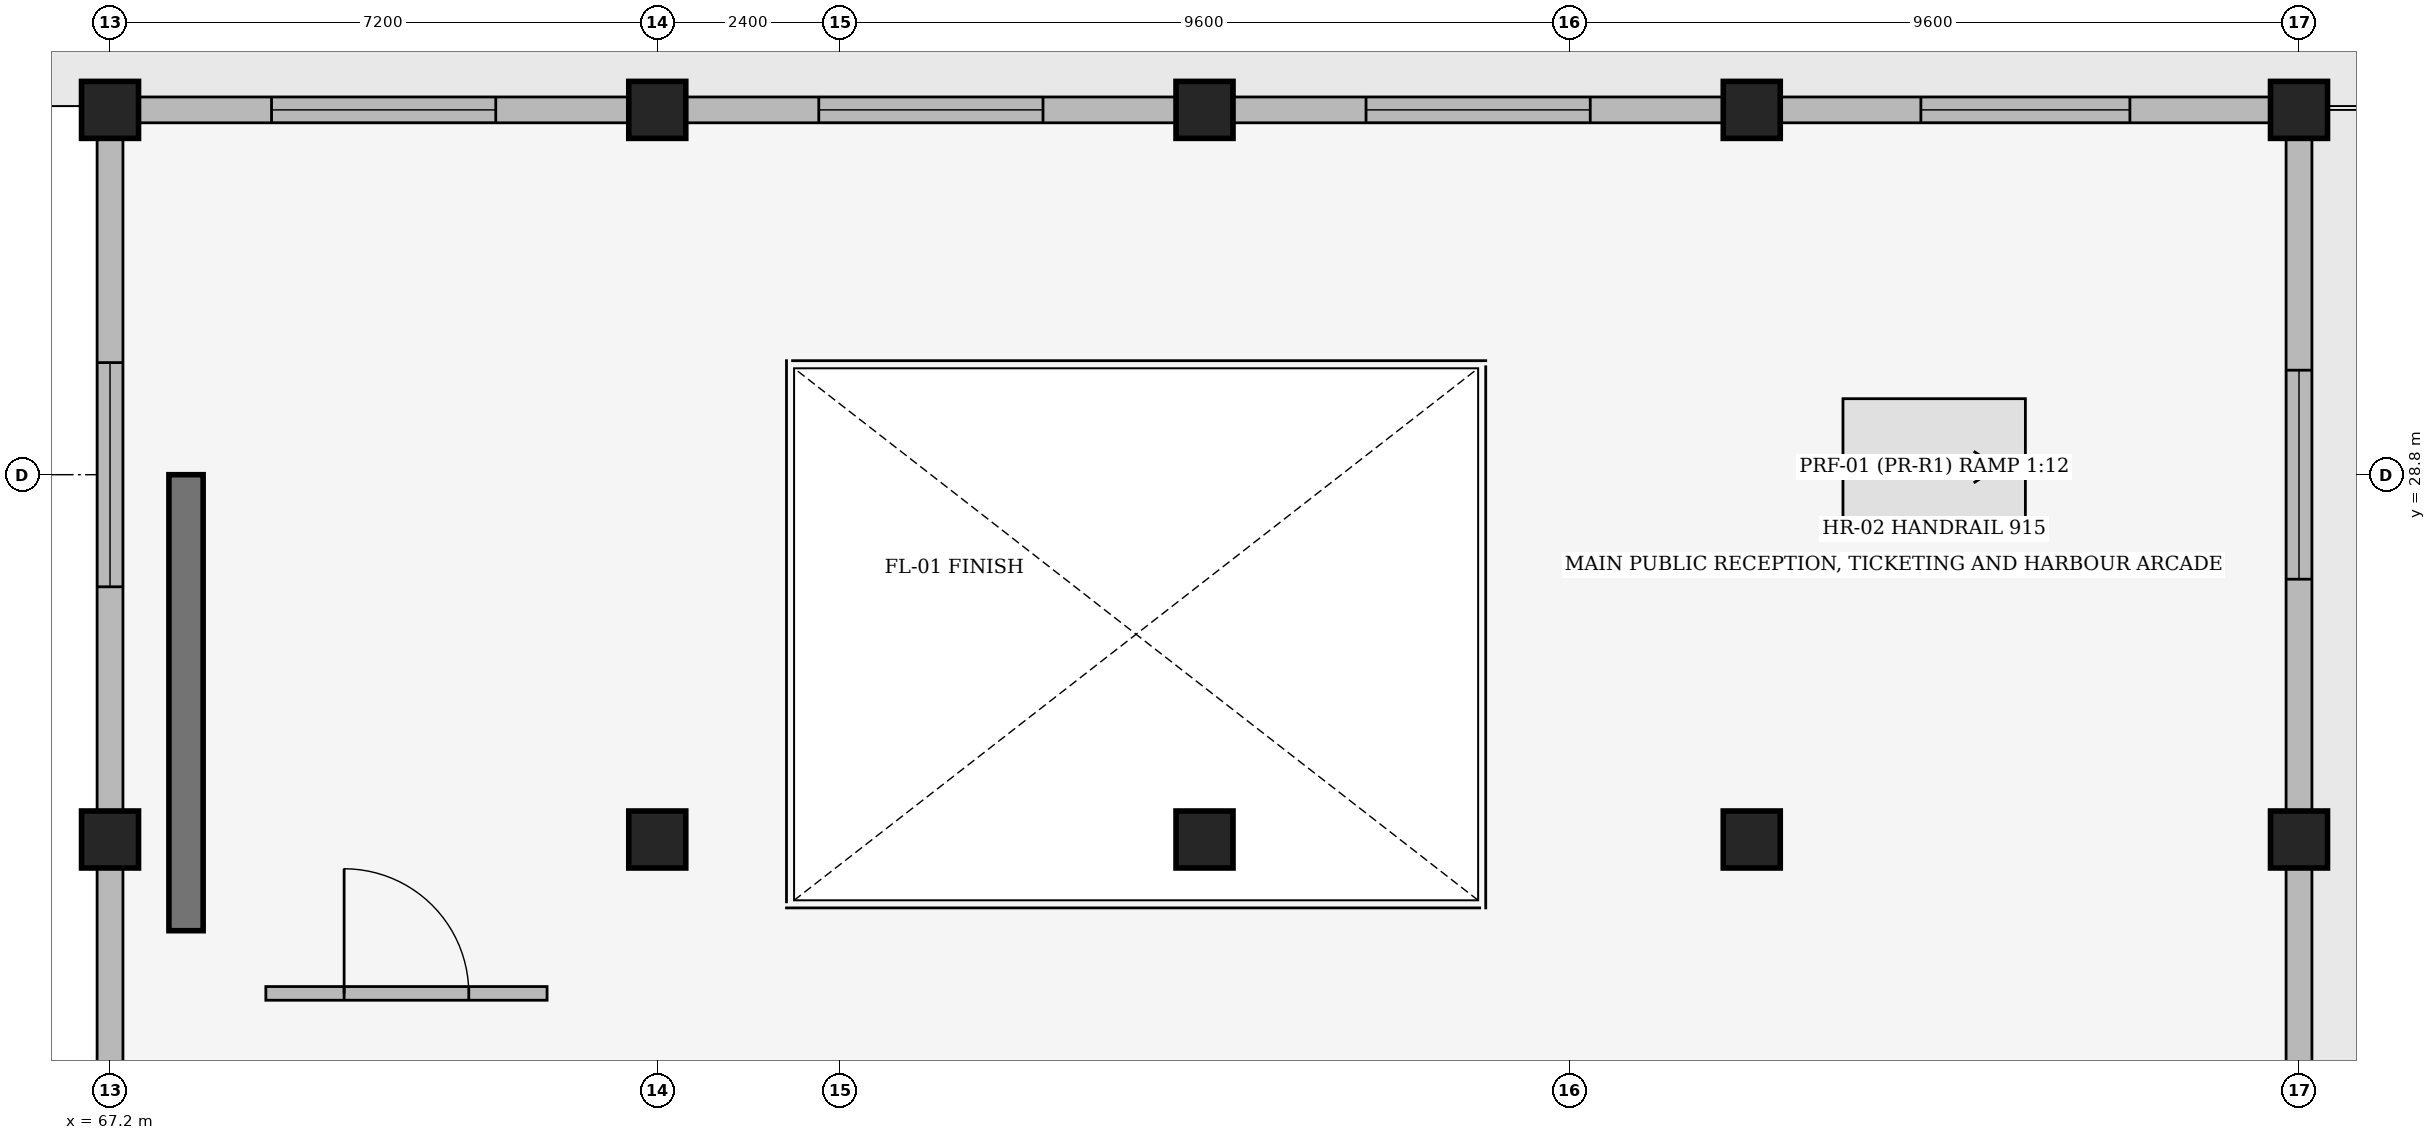
"""IFC4 building model, lengths in metres.
Left out: names, types, materials, properties, quantities, classifications, styles, units other than length and angle.
Written with IfcOpenShell. Run it as: python <this file> out.ifc"""

import sys

from ifc_helpers import new_model, si_unit, direction, frame, frame_2d, origin, origin_2d, place, context, subcontext, project, spatial, rectangle, extrude, element, fill, save


model = new_model("IFC4")
c1 = context("Model", 3, precision=1e-05, world=origin(), true_north=direction((0.0, 1.0)))
c2 = subcontext(c1, "Body", "Model", "MODEL_VIEW")
j1 = project(units=[si_unit("LENGTHUNIT", "METRE"), si_unit("PLANEANGLEUNIT", "RADIAN")], contexts=[c1])
p1 = place(None, origin())
s1 = spatial("IfcSite", under=j1, at=p1, CompositionType="ELEMENT")
p2 = place(p1, origin())
s2 = spatial("IfcBuilding", under=s1, at=p2, CompositionType="ELEMENT")
p3 = place(p2, origin())
s3 = spatial("IfcBuildingStorey", under=s2, at=p3, CompositionType="ELEMENT", Elevation=0.0)
for number, where, z_axis, x_axis in (
    (1, (67.2, 24.0, 0.0), (0.0, 0.0, 1.0), (1.0, 0.0, 0.0)),
    (2, (67.2, 33.6, 0.0), (0.0, 0.0, 1.0), (1.0, 0.0, 0.0)),
    (3, (74.4, 24.0, 0.0), (0.0, 0.0, 1.0), (1.0, 0.0, 0.0)),
    (4, (74.4, 33.6, 0.0), (0.0, 0.0, 1.0), (1.0, 0.0, 0.0)),
):
    element("IfcColumn", number, at=place(p3, frame(where, z_axis=z_axis, x_axis=x_axis)), inside=s3, PredefinedType="COLUMN", context=c2, shape_type="SweptSolid", body=[
        extrude(rectangle(XDim=0.75, YDim=0.75, at=origin_2d()), origin(), (0.0, 0.0, 1.0), 5.4),
    ])
p4 = place(p3, frame((81.6, 24.0, -0.3), z_axis=(0.0, 0.0, 1.0), x_axis=(1.0, 0.0, 0.0)))
e5 = element("IfcColumn", 5, at=p4, inside=s3, PredefinedType="COLUMN", context=c2, shape_type="SweptSolid", body=[
    extrude(rectangle(XDim=0.75, YDim=0.75, at=origin_2d()), origin(), (0.0, 0.0, 1.0), 5.7),
])
for number, where, z_axis, x_axis in (
    (6, (81.6, 33.6, 0.0), (0.0, 0.0, 1.0), (1.0, 0.0, 0.0)),
    (7, (88.8, 24.0, 0.0), (0.0, 0.0, 1.0), (1.0, 0.0, 0.0)),
    (8, (88.8, 33.6, 0.0), (0.0, 0.0, 1.0), (1.0, 0.0, 0.0)),
    (9, (96.0, 24.0, 0.0), (0.0, 0.0, 1.0), (1.0, 0.0, 0.0)),
    (10, (96.0, 33.6, 0.0), (0.0, 0.0, 1.0), (1.0, 0.0, 0.0)),
):
    element("IfcColumn", number, at=place(p3, frame(where, z_axis=z_axis, x_axis=x_axis)), inside=s3, PredefinedType="COLUMN", context=c2, shape_type="SweptSolid", body=[
        extrude(rectangle(XDim=0.75, YDim=0.75, at=origin_2d()), origin(), (0.0, 0.0, 1.0), 5.4),
    ])
p5 = place(p3, frame((68.2, 22.8, 0.0), z_axis=(0.0, 0.0, 1.0), x_axis=(0.0, 1.0, 0.0)))
e11 = element("IfcWall", 11, at=p5, inside=s3, PredefinedType="SHEAR", context=c2, shape_type="SweptSolid", body=[
    extrude(rectangle(XDim=6.0, YDim=0.45, at=frame_2d((3.0, 0.0))), origin(), (0.0, 0.0, 1.0), 5.4),
])
p6 = place(p3, frame((96.0, 14.783, 0.0), z_axis=(0.0, 0.0, 1.0), x_axis=(0.0, 1.0, 0.0)))
e12 = element("IfcWall", 12, at=p6, inside=s3, PredefinedType="SOLIDWALL", context=c2, shape_type="SweptSolid", body=[
    extrude(rectangle(XDim=8.834, YDim=0.34, at=frame_2d((4.417, 0.0))), origin(), (0.0, 0.0, 1.0), 4.766),
])
p7 = place(p6, frame((5.417, 0.0, 0.0), z_axis=(0.0, 0.0, 1.0), x_axis=(-1.0, 0.0, 0.0)))
e13 = element("IfcOpeningElement", 13, at=p7, cuts=e12, PredefinedType="OPENING", context=c2, shape_type="SweptSolid", body=[
    extrude(rectangle(XDim=2.0, YDim=2.5, at=frame_2d((1.0, 1.25))), frame((0.0, 0.18, 0.0), z_axis=(0.0, -1.0, 0.0), x_axis=(1.0, 0.0, 0.0)), (0.0, 0.0, 1.0), 0.36),
])
p8 = place(p3, frame((96.0, 24.383, 0.0), z_axis=(0.0, 0.0, 1.0), x_axis=(0.0, 1.0, 0.0)))
e14 = element("IfcWall", 14, at=p8, inside=s3, PredefinedType="SOLIDWALL", context=c2, shape_type="SweptSolid", body=[
    extrude(rectangle(XDim=8.834, YDim=0.34, at=frame_2d((4.417, 0.0))), origin(), (0.0, 0.0, 1.0), 4.649),
])
p9 = place(p8, frame((3.042, 0.0, 0.95)))
e15 = element("IfcOpeningElement", 15, at=p9, cuts=e14, PredefinedType="OPENING", context=c2, shape_type="SweptSolid", body=[
    extrude(rectangle(XDim=2.75, YDim=1.8, at=frame_2d((1.375, 0.9))), frame((0.0, 0.18, 0.0), z_axis=(0.0, -1.0, 0.0), x_axis=(1.0, 0.0, 0.0)), (0.0, 0.0, 1.0), 0.36),
])
p10 = place(p3, frame((95.617, 33.6, 0.0), z_axis=(0.0, 0.0, 1.0), x_axis=(-1.0, 0.0, 0.0)))
e16 = element("IfcWall", 16, at=p10, inside=s3, PredefinedType="SOLIDWALL", context=c2, shape_type="SweptSolid", body=[
    extrude(rectangle(XDim=6.434, YDim=0.34, at=frame_2d((3.217, 0.0))), origin(), (0.0, 0.0, 1.0), 4.758),
])
p11 = place(p10, frame((1.842, 0.0, 0.95)))
e17 = element("IfcOpeningElement", 17, at=p11, cuts=e16, PredefinedType="OPENING", context=c2, shape_type="SweptSolid", body=[
    extrude(rectangle(XDim=2.75, YDim=2.1, at=frame_2d((1.375, 1.05))), frame((0.0, 0.18, 0.0), z_axis=(0.0, -1.0, 0.0), x_axis=(1.0, 0.0, 0.0)), (0.0, 0.0, 1.0), 0.36),
])
p12 = place(p3, frame((88.417, 33.6, 0.0), z_axis=(0.0, 0.0, 1.0), x_axis=(-1.0, 0.0, 0.0)))
e18 = element("IfcWall", 18, at=p12, inside=s3, PredefinedType="SOLIDWALL", context=c2, shape_type="SweptSolid", body=[
    extrude(rectangle(XDim=6.434, YDim=0.34, at=frame_2d((3.217, 0.0))), origin(), (0.0, 0.0, 1.0), 4.863),
])
p13 = place(p12, frame((1.742, 0.0, 0.95)))
e19 = element("IfcOpeningElement", 19, at=p13, cuts=e18, PredefinedType="OPENING", context=c2, shape_type="SweptSolid", body=[
    extrude(rectangle(XDim=2.95, YDim=1.2, at=frame_2d((1.475, 0.6))), frame((0.0, 0.18, 0.0), z_axis=(0.0, -1.0, 0.0), x_axis=(1.0, 0.0, 0.0)), (0.0, 0.0, 1.0), 0.36),
])
p14 = place(p3, frame((81.217, 33.6, 0.0), z_axis=(0.0, 0.0, 1.0), x_axis=(-1.0, 0.0, 0.0)))
e20 = element("IfcWall", 20, at=p14, inside=s3, PredefinedType="SOLIDWALL", context=c2, shape_type="SweptSolid", body=[
    extrude(rectangle(XDim=6.434, YDim=0.34, at=frame_2d((3.217, 0.0))), origin(), (0.0, 0.0, 1.0), 4.758),
])
p15 = place(p14, frame((1.742, 0.0, 0.95)))
e21 = element("IfcOpeningElement", 21, at=p15, cuts=e20, PredefinedType="OPENING", context=c2, shape_type="SweptSolid", body=[
    extrude(rectangle(XDim=2.95, YDim=1.5, at=frame_2d((1.475, 0.75))), frame((0.0, 0.18, 0.0), z_axis=(0.0, -1.0, 0.0), x_axis=(1.0, 0.0, 0.0)), (0.0, 0.0, 1.0), 0.36),
])
p16 = place(p3, frame((74.017, 33.6, 0.0), z_axis=(0.0, 0.0, 1.0), x_axis=(-1.0, 0.0, 0.0)))
e22 = element("IfcWall", 22, at=p16, inside=s3, PredefinedType="SOLIDWALL", context=c2, shape_type="SweptSolid", body=[
    extrude(rectangle(XDim=6.434, YDim=0.34, at=frame_2d((3.217, 0.0))), origin(), (0.0, 0.0, 1.0), 4.863),
])
p17 = place(p16, frame((1.742, 0.0, 0.95)))
e23 = element("IfcOpeningElement", 23, at=p17, cuts=e22, PredefinedType="OPENING", context=c2, shape_type="SweptSolid", body=[
    extrude(rectangle(XDim=2.95, YDim=1.8, at=frame_2d((1.475, 0.9))), frame((0.0, 0.18, 0.0), z_axis=(0.0, -1.0, 0.0), x_axis=(1.0, 0.0, 0.0)), (0.0, 0.0, 1.0), 0.36),
])
p18 = place(p3, frame((67.2, 33.217, 0.0), z_axis=(0.0, 0.0, 1.0), x_axis=(0.0, -1.0, 0.0)))
e24 = element("IfcWall", 24, at=p18, inside=s3, PredefinedType="SOLIDWALL", context=c2, shape_type="SweptSolid", body=[
    extrude(rectangle(XDim=8.834, YDim=0.34, at=frame_2d((4.417, 0.0))), origin(), (0.0, 0.0, 1.0), 4.713),
])
p19 = place(p18, frame((2.942, 0.0, 0.95)))
e25 = element("IfcOpeningElement", 25, at=p19, cuts=e24, PredefinedType="OPENING", context=c2, shape_type="SweptSolid", body=[
    extrude(rectangle(XDim=2.95, YDim=2.1, at=frame_2d((1.475, 1.05))), frame((0.0, 0.18, 0.0), z_axis=(0.0, -1.0, 0.0), x_axis=(1.0, 0.0, 0.0)), (0.0, 0.0, 1.0), 0.36),
])
p20 = place(p3, frame((67.2, 23.617, 0.0), z_axis=(0.0, 0.0, 1.0), x_axis=(0.0, -1.0, 0.0)))
e26 = element("IfcWall", 26, at=p20, inside=s3, PredefinedType="SOLIDWALL", context=c2, shape_type="SweptSolid", body=[
    extrude(rectangle(XDim=8.834, YDim=0.34, at=frame_2d((4.417, 0.0))), origin(), (0.0, 0.0, 1.0), 4.713),
])
p21 = place(p20, frame((2.842, 0.0, 0.95)))
e27 = element("IfcOpeningElement", 27, at=p21, cuts=e26, PredefinedType="OPENING", context=c2, shape_type="SweptSolid", body=[
    extrude(rectangle(XDim=3.15, YDim=1.2, at=frame_2d((1.575, 0.6))), frame((0.0, 0.18, 0.0), z_axis=(0.0, -1.0, 0.0), x_axis=(1.0, 0.0, 0.0)), (0.0, 0.0, 1.0), 0.36),
])
p22 = place(p3, frame((69.25, 21.975, 0.0), z_axis=(0.0, 0.0, 1.0), x_axis=(1.0, 0.0, 0.0)))
e28 = element("IfcWall", 28, at=p22, inside=s3, PredefinedType="PARTITIONING", context=c2, shape_type="SweptSolid", body=[
    extrude(rectangle(XDim=3.7, YDim=0.18, at=frame_2d((1.85, 0.0))), origin(), (0.0, 0.0, 1.0), 4.713),
])
p23 = place(p22, frame((1.03, 0.0, 0.0)))
e29 = element("IfcOpeningElement", 29, at=p23, cuts=e28, PredefinedType="OPENING", context=c2, shape_type="SweptSolid", body=[
    extrude(rectangle(XDim=1.64, YDim=2.35, at=frame_2d((0.82, 1.175))), frame((0.0, 0.1, 0.0), z_axis=(0.0, -1.0, 0.0), x_axis=(1.0, 0.0, 0.0)), (0.0, 0.0, 1.0), 0.2),
])
p24 = place(p9, origin())
e30 = element("IfcWindow", 30, at=p24, inside=s3, PartitioningType="SINGLE_PANEL", PredefinedType="WINDOW", context=c2, shape_type="SweptSolid", body=[
    extrude(rectangle(XDim=2.75, YDim=1.8, at=frame_2d((1.375, 0.9))), frame((0.0, 0.03, 0.0), z_axis=(0.0, -1.0, 0.0), x_axis=(1.0, 0.0, 0.0)), (0.0, 0.0, 1.0), 0.06),
])
fill(e15, e30)
p25 = place(p11, origin())
e31 = element("IfcWindow", 31, at=p25, inside=s3, PartitioningType="SINGLE_PANEL", PredefinedType="WINDOW", context=c2, shape_type="SweptSolid", body=[
    extrude(rectangle(XDim=2.75, YDim=2.1, at=frame_2d((1.375, 1.05))), frame((0.0, 0.03, 0.0), z_axis=(0.0, -1.0, 0.0), x_axis=(1.0, 0.0, 0.0)), (0.0, 0.0, 1.0), 0.06),
])
fill(e17, e31)
p26 = place(p13, origin())
e32 = element("IfcWindow", 32, at=p26, inside=s3, PartitioningType="SINGLE_PANEL", PredefinedType="WINDOW", context=c2, shape_type="SweptSolid", body=[
    extrude(rectangle(XDim=2.95, YDim=1.2, at=frame_2d((1.475, 0.6))), frame((0.0, 0.03, 0.0), z_axis=(0.0, -1.0, 0.0), x_axis=(1.0, 0.0, 0.0)), (0.0, 0.0, 1.0), 0.06),
])
fill(e19, e32)
p27 = place(p15, origin())
e33 = element("IfcWindow", 33, at=p27, inside=s3, PartitioningType="SINGLE_PANEL", PredefinedType="WINDOW", context=c2, shape_type="SweptSolid", body=[
    extrude(rectangle(XDim=2.95, YDim=1.5, at=frame_2d((1.475, 0.75))), frame((0.0, 0.03, 0.0), z_axis=(0.0, -1.0, 0.0), x_axis=(1.0, 0.0, 0.0)), (0.0, 0.0, 1.0), 0.06),
])
fill(e21, e33)
p28 = place(p17, origin())
e34 = element("IfcWindow", 34, at=p28, inside=s3, PartitioningType="SINGLE_PANEL", PredefinedType="WINDOW", context=c2, shape_type="SweptSolid", body=[
    extrude(rectangle(XDim=2.95, YDim=1.8, at=frame_2d((1.475, 0.9))), frame((0.0, 0.03, 0.0), z_axis=(0.0, -1.0, 0.0), x_axis=(1.0, 0.0, 0.0)), (0.0, 0.0, 1.0), 0.06),
])
fill(e23, e34)
p29 = place(p19, origin())
e35 = element("IfcWindow", 35, at=p29, inside=s3, PartitioningType="SINGLE_PANEL", PredefinedType="WINDOW", context=c2, shape_type="SweptSolid", body=[
    extrude(rectangle(XDim=2.95, YDim=2.1, at=frame_2d((1.475, 1.05))), frame((0.0, 0.03, 0.0), z_axis=(0.0, -1.0, 0.0), x_axis=(1.0, 0.0, 0.0)), (0.0, 0.0, 1.0), 0.06),
])
fill(e25, e35)
p30 = place(p23, origin())
e36 = element("IfcDoor", 36, at=p30, inside=s3, OperationType="SINGLE_SWING_LEFT", PredefinedType="DOOR", context=c2, shape_type="SweptSolid", body=[
    extrude(rectangle(XDim=1.64, YDim=2.35, at=frame_2d((0.82, 1.175))), frame((0.0, 0.025, 0.0), z_axis=(0.0, -1.0, 0.0), x_axis=(1.0, 0.0, 0.0)), (0.0, 0.0, 1.0), 0.05),
])
fill(e29, e36)
save(model, sys.argv[1])
